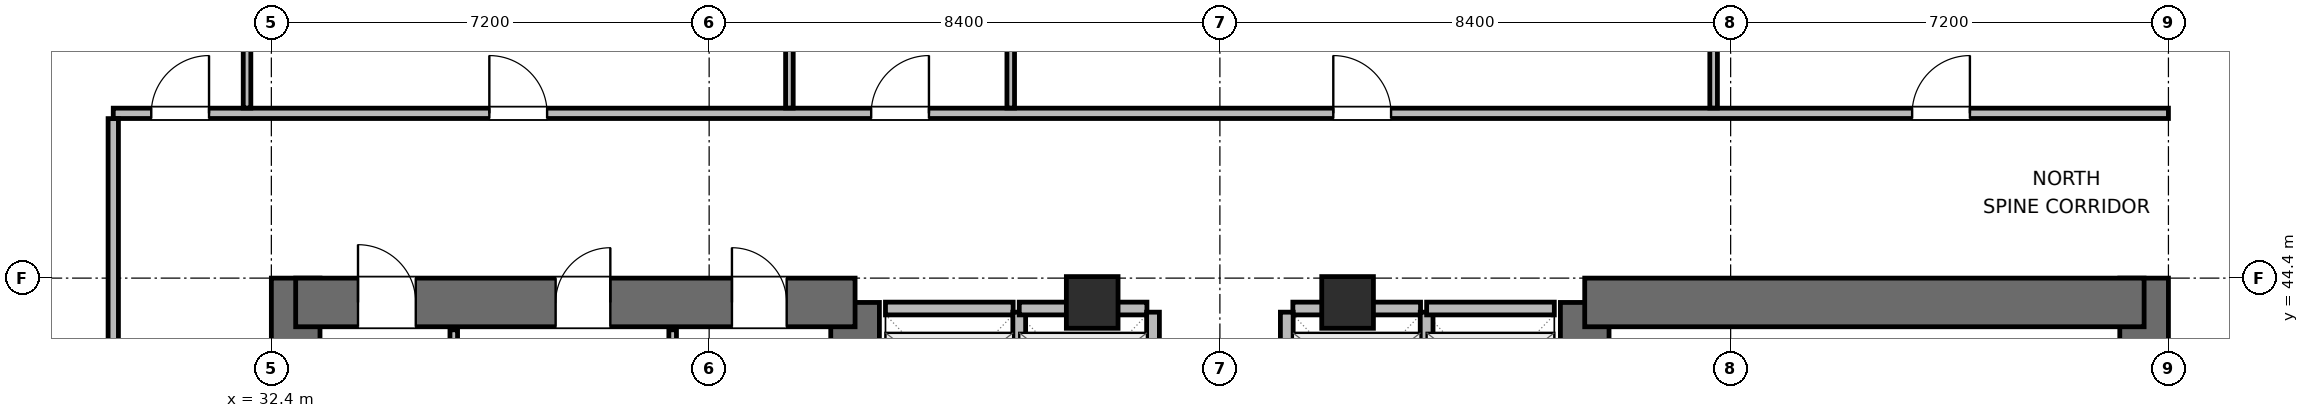
"""IFC4 building model, lengths in metres.
Left out: names, types, materials, properties, quantities, classifications, styles, units other than length and angle.
Written with IfcOpenShell. Run it as: python <this file> out.ifc"""

import sys

from ifc_helpers import new_model, si_unit, direction, frame, frame_2d, origin, origin_2d, place, context, subcontext, project, spatial, rectangle, extrude, element, fill, save


model = new_model("IFC4")
c1 = context("Model", 3, precision=1e-05, world=origin(), true_north=direction((0.0, 1.0)))
c2 = subcontext(c1, "Body", "Model", "MODEL_VIEW")
j1 = project(units=[si_unit("LENGTHUNIT", "METRE"), si_unit("PLANEANGLEUNIT", "RADIAN")], contexts=[c1])
p1 = place(None, origin())
s1 = spatial("IfcSite", under=j1, at=p1, CompositionType="ELEMENT")
p2 = place(p1, origin())
s2 = spatial("IfcBuilding", under=s1, at=p2, CompositionType="ELEMENT")
p3 = place(p2, frame((0.0, 0.0, 166.2)))
s3 = spatial("IfcBuildingStorey", under=s2, at=p3, CompositionType="ELEMENT", Elevation=166.2)
p4 = place(p3, frame((32.8, 27.6, 0.0), z_axis=(0.0, 0.0, 1.0), x_axis=(0.0, 1.0, 0.0)))
e1 = element("IfcWall", 1, at=p4, inside=s3, PredefinedType="SHEAR", context=c2, shape_type="SweptSolid", body=[
    extrude(rectangle(XDim=16.8, YDim=0.8, at=frame_2d((8.4, 0.0))), origin(), (0.0, 0.0, 1.0), 3.9),
])
p5 = place(p3, frame((42.0, 37.8, 0.0), z_axis=(0.0, 0.0, 1.0), x_axis=(0.0, 1.0, 0.0)))
e2 = element("IfcWall", 2, at=p5, inside=s3, PredefinedType="SHEAR", context=c2, shape_type="SweptSolid", body=[
    extrude(rectangle(XDim=6.2, YDim=0.8, at=frame_2d((3.1, 0.0))), origin(), (0.0, 0.0, 1.0), 3.9),
])
p6 = place(p3, frame((32.8, 44.0, 0.0), z_axis=(0.0, 0.0, 1.0), x_axis=(1.0, 0.0, 0.0)))
e3 = element("IfcWall", 3, at=p6, inside=s3, PredefinedType="SHEAR", context=c2, shape_type="SweptSolid", body=[
    extrude(rectangle(XDim=9.2, YDim=0.8, at=frame_2d((4.6, 0.0))), origin(), (0.0, 0.0, 1.0), 3.9),
])
p7 = place(p6, frame((1.025, 0.0, 0.0)))
e4 = element("IfcOpeningElement", 4, at=p7, cuts=e3, PredefinedType="OPENING", context=c2, shape_type="SweptSolid", body=[
    extrude(rectangle(XDim=0.95, YDim=2.04, at=frame_2d((0.475, 1.02))), frame((0.0, 0.41, 0.0), z_axis=(0.0, -1.0, 0.0), x_axis=(1.0, 0.0, 0.0)), (0.0, 0.0, 1.0), 0.82),
])
p8 = place(p6, frame((4.275, 0.0, 0.0)))
e5 = element("IfcOpeningElement", 5, at=p8, cuts=e3, PredefinedType="OPENING", context=c2, shape_type="SweptSolid", body=[
    extrude(rectangle(XDim=0.9, YDim=2.02, at=frame_2d((0.45, 1.01))), frame((0.0, 0.41, 0.0), z_axis=(0.0, -1.0, 0.0), x_axis=(1.0, 0.0, 0.0)), (0.0, 0.0, 1.0), 0.82),
])
p9 = place(p6, frame((7.175, 0.0, 0.0)))
e6 = element("IfcOpeningElement", 6, at=p9, cuts=e3, PredefinedType="OPENING", context=c2, shape_type="SweptSolid", body=[
    extrude(rectangle(XDim=0.9, YDim=2.02, at=frame_2d((0.45, 1.01))), frame((0.0, 0.41, 0.0), z_axis=(0.0, -1.0, 0.0), x_axis=(1.0, 0.0, 0.0)), (0.0, 0.0, 1.0), 0.82),
])
p10 = place(p3, frame((54.0, 38.0, 0.0), z_axis=(0.0, 0.0, 1.0), x_axis=(0.0, 1.0, 0.0)))
e7 = element("IfcWall", 7, at=p10, inside=s3, PredefinedType="SHEAR", context=c2, shape_type="SweptSolid", body=[
    extrude(rectangle(XDim=6.0, YDim=0.8, at=frame_2d((3.0, 0.0))), origin(), (0.0, 0.0, 1.0), 3.9),
])
p11 = place(p3, frame((63.2, 27.6, 0.0), z_axis=(0.0, 0.0, 1.0), x_axis=(0.0, 1.0, 0.0)))
e8 = element("IfcWall", 8, at=p11, inside=s3, PredefinedType="SHEAR", context=c2, shape_type="SweptSolid", body=[
    extrude(rectangle(XDim=16.8, YDim=0.8, at=frame_2d((8.4, 0.0))), origin(), (0.0, 0.0, 1.0), 3.9),
])
p12 = place(p3, frame((54.0, 44.0, 0.0), z_axis=(0.0, 0.0, 1.0), x_axis=(1.0, 0.0, 0.0)))
e9 = element("IfcWall", 9, at=p12, inside=s3, PredefinedType="SHEAR", context=c2, shape_type="SweptSolid", body=[
    extrude(rectangle(XDim=9.2, YDim=0.8, at=frame_2d((4.6, 0.0))), origin(), (0.0, 0.0, 1.0), 3.9),
])
for number, where, z_axis, x_axis in (
    (10, (45.9, 44.0, 0.0), (0.0, 0.0, 1.0), (1.0, 0.0, 0.0)),
    (11, (50.1, 44.0, 0.0), (0.0, 0.0, 1.0), (1.0, 0.0, 0.0)),
):
    element("IfcColumn", number, at=place(p3, frame(where, z_axis=z_axis, x_axis=x_axis)), inside=s3, PredefinedType="COLUMN", context=c2, shape_type="SweptSolid", body=[
        extrude(rectangle(XDim=0.85, YDim=0.85, at=origin_2d()), origin(), (0.0, 0.0, 1.0), 3.9),
    ])
for number, where, z_axis, x_axis in (
    (12, (35.4, 41.095, 0.0), (0.0, 0.0, 1.0), (0.0, 1.0, 0.0)),
    (13, (39.0, 41.095, 0.0), (0.0, 0.0, 1.0), (0.0, 1.0, 0.0)),
):
    element("IfcWall", number, at=place(p3, frame(where, z_axis=z_axis, x_axis=x_axis)), inside=s3, PredefinedType="PARTITIONING", context=c2, shape_type="SweptSolid", body=[
        extrude(rectangle(XDim=2.455, YDim=0.125, at=frame_2d((1.228, 0.0))), origin(), (0.0, 0.0, 1.0), 3.68),
    ])
p13 = place(p3, frame((42.5, 43.9, 0.0), z_axis=(0.0, 0.0, 1.0), x_axis=(1.0, 0.0, 0.0)))
e14 = element("IfcWall", 14, at=p13, inside=s3, PredefinedType="PARTITIONING", context=c2, shape_type="SweptSolid", body=[
    extrude(rectangle(XDim=2.1, YDim=0.21, at=frame_2d((1.05, 0.0))), origin(), (0.0, 0.0, 1.0), 2.765),
])
p14 = place(p3, frame((44.7, 41.56, 0.0), z_axis=(0.0, 0.0, 1.0), x_axis=(0.0, 1.0, 0.0)))
e15 = element("IfcWall", 15, at=p14, inside=s3, PredefinedType="PARTITIONING", context=c2, shape_type="SweptSolid", body=[
    extrude(rectangle(XDim=2.28, YDim=0.21, at=frame_2d((1.14, 0.0))), origin(), (0.0, 0.0, 1.0), 3.68),
])
p15 = place(p3, frame((44.7, 43.9, 0.0), z_axis=(0.0, 0.0, 1.0), x_axis=(1.0, 0.0, 0.0)))
e16 = element("IfcWall", 16, at=p15, inside=s3, PredefinedType="PARTITIONING", context=c2, shape_type="SweptSolid", body=[
    extrude(rectangle(XDim=2.1, YDim=0.21, at=frame_2d((1.05, 0.0))), origin(), (0.0, 0.0, 1.0), 2.765),
])
p16 = place(p3, frame((46.9, 41.56, 0.0), z_axis=(0.0, 0.0, 1.0), x_axis=(0.0, 1.0, 0.0)))
e17 = element("IfcWall", 17, at=p16, inside=s3, PredefinedType="PARTITIONING", context=c2, shape_type="SweptSolid", body=[
    extrude(rectangle(XDim=2.28, YDim=0.21, at=frame_2d((1.14, 0.0))), origin(), (0.0, 0.0, 1.0), 3.68),
])
p17 = place(p3, frame((49.2, 43.9, 0.0), z_axis=(0.0, 0.0, 1.0), x_axis=(1.0, 0.0, 0.0)))
e18 = element("IfcWall", 18, at=p17, inside=s3, PredefinedType="PARTITIONING", context=c2, shape_type="SweptSolid", body=[
    extrude(rectangle(XDim=2.1, YDim=0.21, at=frame_2d((1.05, 0.0))), origin(), (0.0, 0.0, 1.0), 2.765),
])
for number, where, z_axis, x_axis in (
    (19, (49.1, 41.56, 0.0), (0.0, 0.0, 1.0), (0.0, 1.0, 0.0)),
    (20, (51.4, 41.56, 0.0), (0.0, 0.0, 1.0), (0.0, 1.0, 0.0)),
):
    element("IfcWall", number, at=place(p3, frame(where, z_axis=z_axis, x_axis=x_axis)), inside=s3, PredefinedType="PARTITIONING", context=c2, shape_type="SweptSolid", body=[
        extrude(rectangle(XDim=2.28, YDim=0.21, at=frame_2d((1.14, 0.0))), origin(), (0.0, 0.0, 1.0), 3.68),
    ])
p18 = place(p3, frame((51.4, 43.9, 0.0), z_axis=(0.0, 0.0, 1.0), x_axis=(1.0, 0.0, 0.0)))
e21 = element("IfcWall", 21, at=p18, inside=s3, PredefinedType="PARTITIONING", context=c2, shape_type="SweptSolid", body=[
    extrude(rectangle(XDim=2.1, YDim=0.21, at=frame_2d((1.05, 0.0))), origin(), (0.0, 0.0, 1.0), 2.765),
])
p19 = place(p3, frame((29.8, 47.11, 0.0), z_axis=(0.0, 0.0, 1.0), x_axis=(1.0, 0.0, 0.0)))
e22 = element("IfcWall", 22, at=p19, inside=s3, PredefinedType="PARTITIONING", context=c2, shape_type="SweptSolid", body=[
    extrude(rectangle(XDim=33.8, YDim=0.17, at=frame_2d((16.9, 0.0))), origin(), (0.0, 0.0, 1.0), 3.68),
])
p20 = place(p19, frame((0.625, 0.0, 0.0)))
e23 = element("IfcOpeningElement", 23, at=p20, cuts=e22, PredefinedType="OPENING", context=c2, shape_type="SweptSolid", body=[
    extrude(rectangle(XDim=0.95, YDim=2.04, at=frame_2d((0.475, 1.02))), frame((0.0, 0.095, 0.0), z_axis=(0.0, -1.0, 0.0), x_axis=(1.0, 0.0, 0.0)), (0.0, 0.0, 1.0), 0.19),
])
p21 = place(p19, frame((6.185, 0.0, 0.0)))
e24 = element("IfcOpeningElement", 24, at=p21, cuts=e22, PredefinedType="OPENING", context=c2, shape_type="SweptSolid", body=[
    extrude(rectangle(XDim=0.95, YDim=2.04, at=frame_2d((0.475, 1.02))), frame((0.0, 0.095, 0.0), z_axis=(0.0, -1.0, 0.0), x_axis=(1.0, 0.0, 0.0)), (0.0, 0.0, 1.0), 0.19),
])
p22 = place(p19, frame((12.465, 0.0, 0.0)))
e25 = element("IfcOpeningElement", 25, at=p22, cuts=e22, PredefinedType="OPENING", context=c2, shape_type="SweptSolid", body=[
    extrude(rectangle(XDim=0.95, YDim=2.04, at=frame_2d((0.475, 1.02))), frame((0.0, 0.095, 0.0), z_axis=(0.0, -1.0, 0.0), x_axis=(1.0, 0.0, 0.0)), (0.0, 0.0, 1.0), 0.19),
])
p23 = place(p19, frame((20.065, 0.0, 0.0)))
e26 = element("IfcOpeningElement", 26, at=p23, cuts=e22, PredefinedType="OPENING", context=c2, shape_type="SweptSolid", body=[
    extrude(rectangle(XDim=0.95, YDim=2.04, at=frame_2d((0.475, 1.02))), frame((0.0, 0.095, 0.0), z_axis=(0.0, -1.0, 0.0), x_axis=(1.0, 0.0, 0.0)), (0.0, 0.0, 1.0), 0.19),
])
p24 = place(p19, frame((29.585, 0.0, 0.0)))
e27 = element("IfcOpeningElement", 27, at=p24, cuts=e22, PredefinedType="OPENING", context=c2, shape_type="SweptSolid", body=[
    extrude(rectangle(XDim=0.95, YDim=2.04, at=frame_2d((0.475, 1.02))), frame((0.0, 0.095, 0.0), z_axis=(0.0, -1.0, 0.0), x_axis=(1.0, 0.0, 0.0)), (0.0, 0.0, 1.0), 0.19),
])
p25 = place(p3, frame((29.8, 37.1, 0.0), z_axis=(0.0, 0.0, 1.0), x_axis=(0.0, 1.0, 0.0)))
e28 = element("IfcWall", 28, at=p25, inside=s3, PredefinedType="PARTITIONING", context=c2, shape_type="SweptSolid", body=[
    extrude(rectangle(XDim=9.923, YDim=0.17, at=frame_2d((4.961, 0.0))), origin(), (0.0, 0.0, 1.0), 3.68),
])
p26 = place(p25, frame((4.53, 0.0, 0.0)))
e29 = element("IfcOpeningElement", 29, at=p26, cuts=e28, PredefinedType="OPENING", context=c2, shape_type="SweptSolid", body=[
    extrude(rectangle(XDim=0.95, YDim=2.04, at=frame_2d((0.475, 1.02))), frame((0.0, 0.095, 0.0), z_axis=(0.0, -1.0, 0.0), x_axis=(1.0, 0.0, 0.0)), (0.0, 0.0, 1.0), 0.19),
])
p27 = place(p3, frame((32.0, 47.197, 0.0), z_axis=(0.0, 0.0, 1.0), x_axis=(0.0, 1.0, 0.0)))
e30 = element("IfcWall", 30, at=p27, inside=s3, PredefinedType="PARTITIONING", context=c2, shape_type="SweptSolid", body=[
    extrude(rectangle(XDim=14.968, YDim=0.125, at=frame_2d((7.484, 0.0))), origin(), (0.0, 0.0, 1.0), 3.68),
])
p28 = place(p3, frame((40.92, 47.197, 0.0), z_axis=(0.0, 0.0, 1.0), x_axis=(0.0, 1.0, 0.0)))
e31 = element("IfcWall", 31, at=p28, inside=s3, PredefinedType="PARTITIONING", context=c2, shape_type="SweptSolid", body=[
    extrude(rectangle(XDim=14.968, YDim=0.125, at=frame_2d((7.484, 0.0))), origin(), (0.0, 0.0, 1.0), 3.043),
])
p29 = place(p3, frame((44.56, 47.197, 0.0), z_axis=(0.0, 0.0, 1.0), x_axis=(0.0, 1.0, 0.0)))
e32 = element("IfcWall", 32, at=p29, inside=s3, PredefinedType="PARTITIONING", context=c2, shape_type="SweptSolid", body=[
    extrude(rectangle(XDim=13.328, YDim=0.125, at=frame_2d((6.664, 0.0))), origin(), (0.0, 0.0, 1.0), 3.043),
])
p30 = place(p3, frame((56.12, 47.197, 0.0), z_axis=(0.0, 0.0, 1.0), x_axis=(0.0, 1.0, 0.0)))
e33 = element("IfcWall", 33, at=p30, inside=s3, PredefinedType="PARTITIONING", context=c2, shape_type="SweptSolid", body=[
    extrude(rectangle(XDim=14.928, YDim=0.125, at=frame_2d((7.464, 0.0))), origin(), (0.0, 0.0, 1.0), 3.043),
])
p31 = place(p7, origin())
e34 = element("IfcDoor", 34, at=p31, inside=s3, OperationType="SINGLE_SWING_LEFT", PredefinedType="DOOR", context=c2, shape_type="SweptSolid", body=[
    extrude(rectangle(XDim=0.95, YDim=2.04, at=frame_2d((0.475, 1.02))), frame((0.0, 0.025, 0.0), z_axis=(0.0, -1.0, 0.0), x_axis=(1.0, 0.0, 0.0)), (0.0, 0.0, 1.0), 0.05),
])
fill(e4, e34)
p32 = place(p8, origin())
e35 = element("IfcDoor", 35, at=p32, inside=s3, OperationType="SINGLE_SWING_RIGHT", PredefinedType="DOOR", context=c2, shape_type="SweptSolid", body=[
    extrude(rectangle(XDim=0.9, YDim=2.02, at=frame_2d((0.45, 1.01))), frame((0.0, 0.025, 0.0), z_axis=(0.0, -1.0, 0.0), x_axis=(1.0, 0.0, 0.0)), (0.0, 0.0, 1.0), 0.05),
])
fill(e5, e35)
p33 = place(p9, origin())
e36 = element("IfcDoor", 36, at=p33, inside=s3, OperationType="SINGLE_SWING_LEFT", PredefinedType="DOOR", context=c2, shape_type="SweptSolid", body=[
    extrude(rectangle(XDim=0.9, YDim=2.02, at=frame_2d((0.45, 1.01))), frame((0.0, 0.025, 0.0), z_axis=(0.0, -1.0, 0.0), x_axis=(1.0, 0.0, 0.0)), (0.0, 0.0, 1.0), 0.05),
])
fill(e6, e36)
p34 = place(p20, origin())
e37 = element("IfcDoor", 37, at=p34, inside=s3, OperationType="SINGLE_SWING_RIGHT", PredefinedType="DOOR", context=c2, shape_type="SweptSolid", body=[
    extrude(rectangle(XDim=0.95, YDim=2.04, at=frame_2d((0.475, 1.02))), frame((0.0, 0.025, 0.0), z_axis=(0.0, -1.0, 0.0), x_axis=(1.0, 0.0, 0.0)), (0.0, 0.0, 1.0), 0.05),
])
fill(e23, e37)
p35 = place(p21, origin())
e38 = element("IfcDoor", 38, at=p35, inside=s3, OperationType="SINGLE_SWING_LEFT", PredefinedType="DOOR", context=c2, shape_type="SweptSolid", body=[
    extrude(rectangle(XDim=0.95, YDim=2.04, at=frame_2d((0.475, 1.02))), frame((0.0, 0.025, 0.0), z_axis=(0.0, -1.0, 0.0), x_axis=(1.0, 0.0, 0.0)), (0.0, 0.0, 1.0), 0.05),
])
fill(e24, e38)
p36 = place(p22, origin())
e39 = element("IfcDoor", 39, at=p36, inside=s3, OperationType="SINGLE_SWING_RIGHT", PredefinedType="DOOR", context=c2, shape_type="SweptSolid", body=[
    extrude(rectangle(XDim=0.95, YDim=2.04, at=frame_2d((0.475, 1.02))), frame((0.0, 0.025, 0.0), z_axis=(0.0, -1.0, 0.0), x_axis=(1.0, 0.0, 0.0)), (0.0, 0.0, 1.0), 0.05),
])
fill(e25, e39)
p37 = place(p23, origin())
e40 = element("IfcDoor", 40, at=p37, inside=s3, OperationType="SINGLE_SWING_LEFT", PredefinedType="DOOR", context=c2, shape_type="SweptSolid", body=[
    extrude(rectangle(XDim=0.95, YDim=2.04, at=frame_2d((0.475, 1.02))), frame((0.0, 0.025, 0.0), z_axis=(0.0, -1.0, 0.0), x_axis=(1.0, 0.0, 0.0)), (0.0, 0.0, 1.0), 0.05),
])
fill(e26, e40)
p38 = place(p24, origin())
e41 = element("IfcDoor", 41, at=p38, inside=s3, OperationType="SINGLE_SWING_RIGHT", PredefinedType="DOOR", context=c2, shape_type="SweptSolid", body=[
    extrude(rectangle(XDim=0.95, YDim=2.04, at=frame_2d((0.475, 1.02))), frame((0.0, 0.025, 0.0), z_axis=(0.0, -1.0, 0.0), x_axis=(1.0, 0.0, 0.0)), (0.0, 0.0, 1.0), 0.05),
])
fill(e27, e41)
save(model, sys.argv[1])
